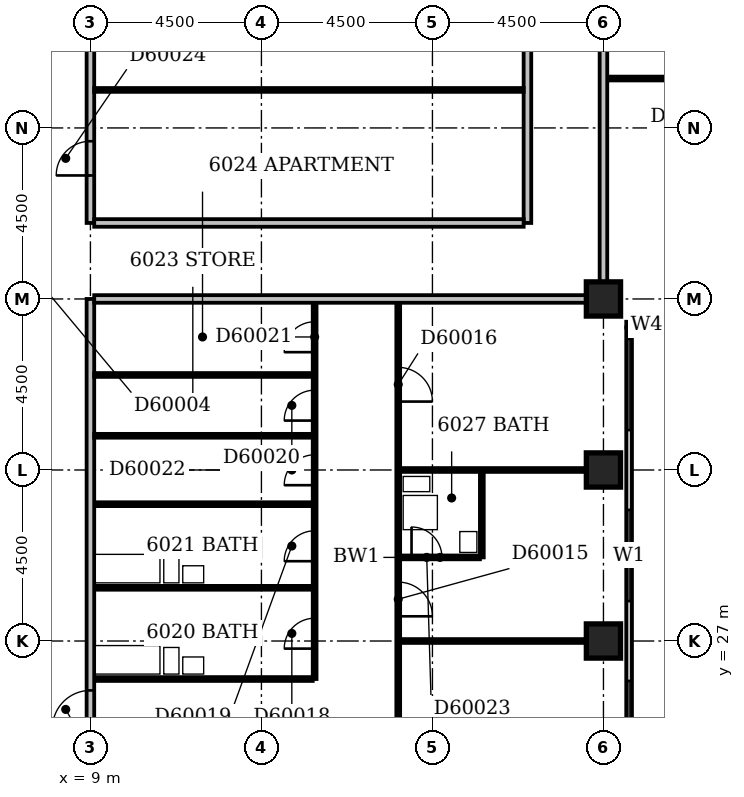
"""IFC4 building model, lengths in metres.
Left out: names, types, materials, properties, quantities, classifications, styles, units other than length and angle.
Written with IfcOpenShell. Run it as: python <this file> out.ifc"""

import sys

from ifc_helpers import new_model, si_unit, direction, frame, frame_2d, origin, origin_2d, place, context, subcontext, project, spatial, rectangle, extrude, element, fill, save


model = new_model("IFC4")
c1 = context("Model", 3, precision=1e-05, world=origin(), true_north=direction((0.0, 1.0)))
c2 = subcontext(c1, "Body", "Model", "MODEL_VIEW")
j1 = project(units=[si_unit("LENGTHUNIT", "METRE"), si_unit("PLANEANGLEUNIT", "RADIAN")], contexts=[c1])
p1 = place(None, origin())
s1 = spatial("IfcSite", under=j1, at=p1, CompositionType="ELEMENT")
p2 = place(p1, origin())
s2 = spatial("IfcBuilding", under=s1, at=p2, CompositionType="ELEMENT")
p3 = place(p2, frame((0.0, 0.0, 233.0)))
s3 = spatial("IfcBuildingStorey", under=s2, at=p3, CompositionType="ELEMENT", Elevation=233.0)
for number, where, z_axis, x_axis in (
    (1, (22.5, 27.0, -0.35), (0.0, 0.0, 1.0), (1.0, 0.0, 0.0)),
    (2, (22.5, 31.5, -0.35), (0.0, 0.0, 1.0), (1.0, 0.0, 0.0)),
    (3, (22.5, 36.0, -0.35), (0.0, 0.0, 1.0), (1.0, 0.0, 0.0)),
):
    element("IfcColumn", number, at=place(p3, frame(where, z_axis=z_axis, x_axis=x_axis)), inside=s3, PredefinedType="COLUMN", context=c2, shape_type="SweptSolid", body=[
        extrude(rectangle(XDim=0.9, YDim=0.9, at=origin_2d()), origin(), (0.0, 0.0, 1.0), 3.65),
    ])
p4 = place(p3, frame((23.175, 17.4, 0.0), z_axis=(0.0, 0.0, 1.0), x_axis=(0.0, 1.0, 0.0)))
e4 = element("IfcWall", 4, at=p4, inside=s3, PredefinedType="STANDARD", context=c2, shape_type="SweptSolid", body=[
    extrude(rectangle(XDim=17.85, YDim=0.15, at=frame_2d((8.925, 0.0))), origin(), (0.0, 0.0, 1.0), 2.7),
])
p5 = place(p4, frame((2.941, 0.0, 0.6)))
e5 = element("IfcOpeningElement", 5, at=p5, cuts=e4, PredefinedType="OPENING", context=c2, shape_type="SweptSolid", body=[
    extrude(rectangle(XDim=1.5, YDim=1.8, at=frame_2d((0.75, 0.9))), frame((0.0, 0.087, 0.0), z_axis=(0.0, -1.0, 0.0), x_axis=(1.0, 0.0, 0.0)), (0.0, 0.0, 1.0), 0.174),
])
p6 = place(p4, frame((6.15, 0.0, 0.6)))
e6 = element("IfcOpeningElement", 6, at=p6, cuts=e4, PredefinedType="OPENING", context=c2, shape_type="SweptSolid", body=[
    extrude(rectangle(XDim=2.4, YDim=1.8, at=frame_2d((1.2, 0.9))), frame((0.0, 0.087, 0.0), z_axis=(0.0, -1.0, 0.0), x_axis=(1.0, 0.0, 0.0)), (0.0, 0.0, 1.0), 0.174),
])
p7 = place(p4, frame((10.65, 0.0, 0.6)))
e7 = element("IfcOpeningElement", 7, at=p7, cuts=e4, PredefinedType="OPENING", context=c2, shape_type="SweptSolid", body=[
    extrude(rectangle(XDim=2.4, YDim=1.8, at=frame_2d((1.2, 0.9))), frame((0.0, 0.087, 0.0), z_axis=(0.0, -1.0, 0.0), x_axis=(1.0, 0.0, 0.0)), (0.0, 0.0, 1.0), 0.174),
])
p8 = place(p4, frame((15.15, 0.0, 0.6)))
e8 = element("IfcOpeningElement", 8, at=p8, cuts=e4, PredefinedType="OPENING", context=c2, shape_type="SweptSolid", body=[
    extrude(rectangle(XDim=2.4, YDim=1.8, at=frame_2d((1.2, 0.9))), frame((0.0, 0.087, 0.0), z_axis=(0.0, -1.0, 0.0), x_axis=(1.0, 0.0, 0.0)), (0.0, 0.0, 1.0), 0.174),
])
p9 = place(p3, frame((23.1, 35.325, 0.0), z_axis=(0.0, 0.0, 1.0), x_axis=(1.0, 0.0, 0.0)))
e9 = element("IfcWall", 9, at=p9, inside=s3, PredefinedType="STANDARD", context=c2, shape_type="SweptSolid", body=[
    extrude(rectangle(XDim=18.15, YDim=0.15, at=frame_2d((9.075, 0.0))), origin(), (0.0, 0.0, 1.0), 2.7),
])
p10 = place(p9, frame((0.239, 0.0, 0.6)))
e10 = element("IfcOpeningElement", 10, at=p10, cuts=e9, PredefinedType="OPENING", context=c2, shape_type="SweptSolid", body=[
    extrude(rectangle(XDim=0.6, YDim=1.8, at=frame_2d((0.3, 0.9))), frame((0.0, 0.087, 0.0), z_axis=(0.0, -1.0, 0.0), x_axis=(1.0, 0.0, 0.0)), (0.0, 0.0, 1.0), 0.174),
])
p11 = place(p9, frame((2.745, 0.0, 0.6)))
e11 = element("IfcOpeningElement", 11, at=p11, cuts=e9, PredefinedType="OPENING", context=c2, shape_type="SweptSolid", body=[
    extrude(rectangle(XDim=0.45, YDim=1.8, at=frame_2d((0.225, 0.9))), frame((0.0, 0.087, 0.0), z_axis=(0.0, -1.0, 0.0), x_axis=(1.0, 0.0, 0.0)), (0.0, 0.0, 1.0), 0.174),
])
p12 = place(p9, frame((4.95, 0.0, 0.6)))
e12 = element("IfcOpeningElement", 12, at=p12, cuts=e9, PredefinedType="OPENING", context=c2, shape_type="SweptSolid", body=[
    extrude(rectangle(XDim=2.4, YDim=1.8, at=frame_2d((1.2, 0.9))), frame((0.0, 0.087, 0.0), z_axis=(0.0, -1.0, 0.0), x_axis=(1.0, 0.0, 0.0)), (0.0, 0.0, 1.0), 0.174),
])
p13 = place(p9, frame((9.45, 0.0, 0.6)))
e13 = element("IfcOpeningElement", 13, at=p13, cuts=e9, PredefinedType="OPENING", context=c2, shape_type="SweptSolid", body=[
    extrude(rectangle(XDim=2.4, YDim=1.8, at=frame_2d((1.2, 0.9))), frame((0.0, 0.087, 0.0), z_axis=(0.0, -1.0, 0.0), x_axis=(1.0, 0.0, 0.0)), (0.0, 0.0, 1.0), 0.174),
])
p14 = place(p9, frame((13.95, 0.0, 0.6)))
e14 = element("IfcOpeningElement", 14, at=p14, cuts=e9, PredefinedType="OPENING", context=c2, shape_type="SweptSolid", body=[
    extrude(rectangle(XDim=2.4, YDim=1.8, at=frame_2d((1.2, 0.9))), frame((0.0, 0.087, 0.0), z_axis=(0.0, -1.0, 0.0), x_axis=(1.0, 0.0, 0.0)), (0.0, 0.0, 1.0), 0.174),
])
p15 = place(p3, frame((17.1, 17.4, 0.0), z_axis=(0.0, 0.0, 1.0), x_axis=(0.0, 1.0, 0.0)))
e15 = element("IfcWall", 15, at=p15, inside=s3, PredefinedType="PARTITIONING", context=c2, shape_type="SweptSolid", body=[
    extrude(rectangle(XDim=18.5, YDim=0.1, at=frame_2d((9.25, 0.0))), origin(), (0.0, 0.0, 1.0), 3.3),
])
p16 = place(p15, frame((4.6, 0.0, 0.0)))
e16 = element("IfcOpeningElement", 16, at=p16, cuts=e15, PredefinedType="OPENING", context=c2, shape_type="SweptSolid", body=[
    extrude(rectangle(XDim=0.9, YDim=2.1, at=frame_2d((0.45, 1.05))), frame((0.0, 0.062, 0.0), z_axis=(0.0, -1.0, 0.0), x_axis=(1.0, 0.0, 0.0)), (0.0, 0.0, 1.0), 0.124),
])
p17 = place(p15, frame((10.25, 0.0, 0.0)))
e17 = element("IfcOpeningElement", 17, at=p17, cuts=e15, PredefinedType="OPENING", context=c2, shape_type="SweptSolid", body=[
    extrude(rectangle(XDim=0.9, YDim=2.1, at=frame_2d((0.45, 1.05))), frame((0.0, 0.062, 0.0), z_axis=(0.0, -1.0, 0.0), x_axis=(1.0, 0.0, 0.0)), (0.0, 0.0, 1.0), 0.124),
])
p18 = place(p15, frame((15.9, 0.0, 0.0)))
e18 = element("IfcOpeningElement", 18, at=p18, cuts=e15, PredefinedType="OPENING", context=c2, shape_type="SweptSolid", body=[
    extrude(rectangle(XDim=0.9, YDim=2.1, at=frame_2d((0.45, 1.05))), frame((0.0, 0.062, 0.0), z_axis=(0.0, -1.0, 0.0), x_axis=(1.0, 0.0, 0.0)), (0.0, 0.0, 1.0), 0.124),
])
p19 = place(p3, frame((9.0, 18.45, 0.0), z_axis=(0.0, 0.0, 1.0), x_axis=(0.0, 1.0, 0.0)))
e19 = element("IfcWall", 19, at=p19, inside=s3, PredefinedType="PARTITIONING", context=c2, shape_type="SweptSolid", body=[
    extrude(rectangle(XDim=17.55, YDim=0.2, at=frame_2d((8.775, 0.0))), origin(), (0.0, 0.0, 1.0), 3.3),
])
p20 = place(p19, frame((6.25, 0.0, 0.0)))
e20 = element("IfcOpeningElement", 20, at=p20, cuts=e19, PredefinedType="OPENING", context=c2, shape_type="SweptSolid", body=[
    extrude(rectangle(XDim=1.0, YDim=2.1, at=frame_2d((0.5, 1.05))), frame((0.0, 0.112, 0.0), z_axis=(0.0, -1.0, 0.0), x_axis=(1.0, 0.0, 0.0)), (0.0, 0.0, 1.0), 0.224),
])
p21 = place(p3, frame((9.1, 26.0, 0.0), z_axis=(0.0, 0.0, 1.0), x_axis=(1.0, 0.0, 0.0)))
e21 = element("IfcWall", 21, at=p21, inside=s3, PredefinedType="PLUMBINGWALL", context=c2, shape_type="SweptSolid", body=[
    extrude(rectangle(XDim=5.75, YDim=0.1, at=frame_2d((2.875, 0.0))), origin(), (0.0, 0.0, 1.0), 3.3),
])
p22 = place(p3, frame((14.9, 26.0, 0.0), z_axis=(0.0, 0.0, 1.0), x_axis=(0.0, 1.0, 0.0)))
e22 = element("IfcWall", 22, at=p22, inside=s3, PredefinedType="PARTITIONING", context=c2, shape_type="SweptSolid", body=[
    extrude(rectangle(XDim=9.9, YDim=0.1, at=frame_2d((4.95, 0.0))), origin(), (0.0, 0.0, 1.0), 3.3),
])
p23 = place(p22, frame((0.8, 0.0, 0.0)))
e23 = element("IfcOpeningElement", 23, at=p23, cuts=e22, PredefinedType="OPENING", context=c2, shape_type="SweptSolid", body=[
    extrude(rectangle(XDim=0.8, YDim=2.1, at=frame_2d((0.4, 1.05))), frame((0.0, 0.062, 0.0), z_axis=(0.0, -1.0, 0.0), x_axis=(1.0, 0.0, 0.0)), (0.0, 0.0, 1.0), 0.124),
])
p24 = place(p22, frame((3.1, 0.0, 0.0)))
e24 = element("IfcOpeningElement", 24, at=p24, cuts=e22, PredefinedType="OPENING", context=c2, shape_type="SweptSolid", body=[
    extrude(rectangle(XDim=0.8, YDim=2.1, at=frame_2d((0.4, 1.05))), frame((0.0, 0.062, 0.0), z_axis=(0.0, -1.0, 0.0), x_axis=(1.0, 0.0, 0.0)), (0.0, 0.0, 1.0), 0.124),
])
p25 = place(p22, frame((6.8, 0.0, 0.0)))
e25 = element("IfcOpeningElement", 25, at=p25, cuts=e22, PredefinedType="OPENING", context=c2, shape_type="SweptSolid", body=[
    extrude(rectangle(XDim=0.8, YDim=2.1, at=frame_2d((0.4, 1.05))), frame((0.0, 0.062, 0.0), z_axis=(0.0, -1.0, 0.0), x_axis=(1.0, 0.0, 0.0)), (0.0, 0.0, 1.0), 0.124),
])
p26 = place(p22, frame((8.6, 0.0, 0.0)))
e26 = element("IfcOpeningElement", 26, at=p26, cuts=e22, PredefinedType="OPENING", context=c2, shape_type="SweptSolid", body=[
    extrude(rectangle(XDim=0.8, YDim=2.1, at=frame_2d((0.4, 1.05))), frame((0.0, 0.062, 0.0), z_axis=(0.0, -1.0, 0.0), x_axis=(1.0, 0.0, 0.0)), (0.0, 0.0, 1.0), 0.124),
])
p27 = place(p22, frame((5.1, 0.0, 0.0)))
e27 = element("IfcOpeningElement", 27, at=p27, cuts=e22, PredefinedType="OPENING", context=c2, shape_type="SweptSolid", body=[
    extrude(rectangle(XDim=0.8, YDim=2.1, at=frame_2d((0.4, 1.05))), frame((0.0, 0.062, 0.0), z_axis=(0.0, -1.0, 0.0), x_axis=(1.0, 0.0, 0.0)), (0.0, 0.0, 1.0), 0.124),
])
p28 = place(p3, frame((17.15, 27.0, 0.0), z_axis=(0.0, 0.0, 1.0), x_axis=(1.0, 0.0, 0.0)))
e28 = element("IfcWall", 28, at=p28, inside=s3, PredefinedType="PARTITIONING", context=c2, shape_type="SweptSolid", body=[
    extrude(rectangle(XDim=4.9, YDim=0.1, at=frame_2d((2.45, 0.0))), origin(), (0.0, 0.0, 1.0), 2.7),
])
p29 = place(p3, frame((9.1, 28.4, 0.0), z_axis=(0.0, 0.0, 1.0), x_axis=(1.0, 0.0, 0.0)))
e29 = element("IfcWall", 29, at=p29, inside=s3, PredefinedType="PLUMBINGWALL", context=c2, shape_type="SweptSolid", body=[
    extrude(rectangle(XDim=5.75, YDim=0.1, at=frame_2d((2.875, 0.0))), origin(), (0.0, 0.0, 1.0), 3.3),
])
p30 = place(p3, frame((17.15, 29.2, 0.0), z_axis=(0.0, 0.0, 1.0), x_axis=(1.0, 0.0, 0.0)))
e30 = element("IfcWall", 30, at=p30, inside=s3, PredefinedType="PLUMBINGWALL", context=c2, shape_type="SweptSolid", body=[
    extrude(rectangle(XDim=2.1, YDim=0.1, at=frame_2d((1.05, 0.0))), origin(), (0.0, 0.0, 1.0), 3.3),
])
p31 = place(p30, frame((0.3, 0.0, 0.0)))
e31 = element("IfcOpeningElement", 31, at=p31, cuts=e30, PredefinedType="OPENING", context=c2, shape_type="SweptSolid", body=[
    extrude(rectangle(XDim=0.8, YDim=2.1, at=frame_2d((0.4, 1.05))), frame((0.0, 0.062, 0.0), z_axis=(0.0, -1.0, 0.0), x_axis=(1.0, 0.0, 0.0)), (0.0, 0.0, 1.0), 0.124),
])
p32 = place(p3, frame((19.3, 29.2, 0.0), z_axis=(0.0, 0.0, 1.0), x_axis=(0.0, 1.0, 0.0)))
e32 = element("IfcWall", 32, at=p32, inside=s3, PredefinedType="PLUMBINGWALL", context=c2, shape_type="SweptSolid", body=[
    extrude(rectangle(XDim=2.25, YDim=0.1, at=frame_2d((1.125, 0.0))), origin(), (0.0, 0.0, 1.0), 3.3),
])
p33 = place(p3, frame((9.1, 30.6, 0.0), z_axis=(0.0, 0.0, 1.0), x_axis=(1.0, 0.0, 0.0)))
e33 = element("IfcWall", 33, at=p33, inside=s3, PredefinedType="PLUMBINGWALL", context=c2, shape_type="SweptSolid", body=[
    extrude(rectangle(XDim=5.75, YDim=0.1, at=frame_2d((2.875, 0.0))), origin(), (0.0, 0.0, 1.0), 3.3),
])
p34 = place(p3, frame((17.15, 31.5, 0.0), z_axis=(0.0, 0.0, 1.0), x_axis=(1.0, 0.0, 0.0)))
e34 = element("IfcWall", 34, at=p34, inside=s3, PredefinedType="PARTITIONING", context=c2, shape_type="SweptSolid", body=[
    extrude(rectangle(XDim=4.9, YDim=0.1, at=frame_2d((2.45, 0.0))), origin(), (0.0, 0.0, 1.0), 3.3),
])
for number, where, z_axis, x_axis in (
    (35, (9.1, 32.4, 0.0), (0.0, 0.0, 1.0), (1.0, 0.0, 0.0)),
    (36, (9.1, 34.0, 0.0), (0.0, 0.0, 1.0), (1.0, 0.0, 0.0)),
):
    element("IfcWall", number, at=place(p3, frame(where, z_axis=z_axis, x_axis=x_axis)), inside=s3, PredefinedType="PARTITIONING", context=c2, shape_type="SweptSolid", body=[
        extrude(rectangle(XDim=5.75, YDim=0.1, at=frame_2d((2.875, 0.0))), origin(), (0.0, 0.0, 1.0), 3.3),
    ])
p35 = place(p3, frame((9.1, 36.0, 0.0), z_axis=(0.0, 0.0, 1.0), x_axis=(1.0, 0.0, 0.0)))
e37 = element("IfcWall", 37, at=p35, inside=s3, PredefinedType="PARTITIONING", context=c2, shape_type="SweptSolid", body=[
    extrude(rectangle(XDim=12.95, YDim=0.2, at=frame_2d((6.475, 0.0))), origin(), (0.0, 0.0, 1.0), 3.3),
])
p36 = place(p3, frame((22.5, 36.45, 0.0), z_axis=(0.0, 0.0, 1.0), x_axis=(0.0, 1.0, 0.0)))
e38 = element("IfcWall", 38, at=p36, inside=s3, PredefinedType="PARTITIONING", context=c2, shape_type="SweptSolid", body=[
    extrude(rectangle(XDim=13.05, YDim=0.2, at=frame_2d((6.525, 0.0))), origin(), (0.0, 0.0, 1.0), 3.3),
])
p37 = place(p3, frame((9.0, 38.0, 0.0), z_axis=(0.0, 0.0, 1.0), x_axis=(0.0, 1.0, 0.0)))
e39 = element("IfcWall", 39, at=p37, inside=s3, PredefinedType="PARTITIONING", context=c2, shape_type="SweptSolid", body=[
    extrude(rectangle(XDim=11.5, YDim=0.2, at=frame_2d((5.75, 0.0))), origin(), (0.0, 0.0, 1.0), 3.3),
])
p38 = place(p37, frame((1.25, 0.0, 0.0)))
e40 = element("IfcOpeningElement", 40, at=p38, cuts=e39, PredefinedType="OPENING", context=c2, shape_type="SweptSolid", body=[
    extrude(rectangle(XDim=0.9, YDim=2.1, at=frame_2d((0.45, 1.05))), frame((0.0, 0.112, 0.0), z_axis=(0.0, -1.0, 0.0), x_axis=(1.0, 0.0, 0.0)), (0.0, 0.0, 1.0), 0.224),
])
p39 = place(p3, frame((9.1, 38.0, 0.0), z_axis=(0.0, 0.0, 1.0), x_axis=(1.0, 0.0, 0.0)))
e41 = element("IfcWall", 41, at=p39, inside=s3, PredefinedType="PARTITIONING", context=c2, shape_type="SweptSolid", body=[
    extrude(rectangle(XDim=11.3, YDim=0.2, at=frame_2d((5.65, 0.0))), origin(), (0.0, 0.0, 1.0), 3.3),
])
p40 = place(p3, frame((20.5, 38.0, 0.0), z_axis=(0.0, 0.0, 1.0), x_axis=(0.0, 1.0, 0.0)))
e42 = element("IfcWall", 42, at=p40, inside=s3, PredefinedType="PARTITIONING", context=c2, shape_type="SweptSolid", body=[
    extrude(rectangle(XDim=11.5, YDim=0.2, at=frame_2d((5.75, 0.0))), origin(), (0.0, 0.0, 1.0), 3.3),
])
p41 = place(p3, frame((9.1, 41.5, 0.0), z_axis=(0.0, 0.0, 1.0), x_axis=(1.0, 0.0, 0.0)))
e43 = element("IfcWall", 43, at=p41, inside=s3, PredefinedType="PARTITIONING", context=c2, shape_type="SweptSolid", body=[
    extrude(rectangle(XDim=11.3, YDim=0.1, at=frame_2d((5.65, 0.0))), origin(), (0.0, 0.0, 1.0), 3.3),
])
p42 = place(p3, frame((22.6, 41.8, 0.0), z_axis=(0.0, 0.0, 1.0), x_axis=(1.0, 0.0, 0.0)))
e44 = element("IfcWall", 44, at=p42, inside=s3, PredefinedType="PARTITIONING", context=c2, shape_type="SweptSolid", body=[
    extrude(rectangle(XDim=8.8, YDim=0.1, at=frame_2d((4.4, 0.0))), origin(), (0.0, 0.0, 1.0), 3.3),
])
p43 = place(p42, frame((1.7, 0.0, 0.0)))
e45 = element("IfcOpeningElement", 45, at=p43, cuts=e44, PredefinedType="OPENING", context=c2, shape_type="SweptSolid", body=[
    extrude(rectangle(XDim=0.9, YDim=2.1, at=frame_2d((0.45, 1.05))), frame((0.0, 0.062, 0.0), z_axis=(0.0, -1.0, 0.0), x_axis=(1.0, 0.0, 0.0)), (0.0, 0.0, 1.0), 0.124),
])
p44 = place(p42, frame((5.05, 0.0, 0.0)))
e46 = element("IfcOpeningElement", 46, at=p44, cuts=e44, PredefinedType="OPENING", context=c2, shape_type="SweptSolid", body=[
    extrude(rectangle(XDim=0.9, YDim=2.1, at=frame_2d((0.45, 1.05))), frame((0.0, 0.062, 0.0), z_axis=(0.0, -1.0, 0.0), x_axis=(1.0, 0.0, 0.0)), (0.0, 0.0, 1.0), 0.124),
])
p45 = place(p6, origin())
e47 = element("IfcWindow", 47, at=p45, inside=s3, PartitioningType="SINGLE_PANEL", PredefinedType="WINDOW", context=c2, shape_type="SweptSolid", body=[
    extrude(rectangle(XDim=2.4, YDim=1.8, at=frame_2d((1.2, 0.9))), frame((0.0, 0.03, 0.0), z_axis=(0.0, -1.0, 0.0), x_axis=(1.0, 0.0, 0.0)), (0.0, 0.0, 1.0), 0.06),
])
fill(e6, e47)
p46 = place(p7, origin())
e48 = element("IfcWindow", 48, at=p46, inside=s3, PartitioningType="SINGLE_PANEL", PredefinedType="WINDOW", context=c2, shape_type="SweptSolid", body=[
    extrude(rectangle(XDim=2.4, YDim=1.8, at=frame_2d((1.2, 0.9))), frame((0.0, 0.03, 0.0), z_axis=(0.0, -1.0, 0.0), x_axis=(1.0, 0.0, 0.0)), (0.0, 0.0, 1.0), 0.06),
])
fill(e7, e48)
p47 = place(p8, origin())
e49 = element("IfcWindow", 49, at=p47, inside=s3, PartitioningType="SINGLE_PANEL", PredefinedType="WINDOW", context=c2, shape_type="SweptSolid", body=[
    extrude(rectangle(XDim=2.4, YDim=1.8, at=frame_2d((1.2, 0.9))), frame((0.0, 0.03, 0.0), z_axis=(0.0, -1.0, 0.0), x_axis=(1.0, 0.0, 0.0)), (0.0, 0.0, 1.0), 0.06),
])
fill(e8, e49)
p48 = place(p10, origin())
e50 = element("IfcWindow", 50, at=p48, inside=s3, PartitioningType="SINGLE_PANEL", PredefinedType="WINDOW", context=c2, shape_type="SweptSolid", body=[
    extrude(rectangle(XDim=0.6, YDim=1.8, at=frame_2d((0.3, 0.9))), frame((0.0, 0.03, 0.0), z_axis=(0.0, -1.0, 0.0), x_axis=(1.0, 0.0, 0.0)), (0.0, 0.0, 1.0), 0.06),
])
fill(e10, e50)
p49 = place(p17, frame((0.9, 0.0, 0.0), z_axis=(0.0, 0.0, 1.0), x_axis=(-1.0, 0.0, 0.0)))
e51 = element("IfcDoor", 51, at=p49, inside=s3, OperationType="SINGLE_SWING_RIGHT", PredefinedType="DOOR", context=c2, shape_type="SweptSolid", body=[
    extrude(rectangle(XDim=0.9, YDim=2.1, at=frame_2d((0.45, 1.05))), frame((0.0, 0.025, 0.0), z_axis=(0.0, -1.0, 0.0), x_axis=(1.0, 0.0, 0.0)), (0.0, 0.0, 1.0), 0.05),
])
fill(e17, e51)
p50 = place(p18, frame((0.9, 0.0, 0.0), z_axis=(0.0, 0.0, 1.0), x_axis=(-1.0, 0.0, 0.0)))
e52 = element("IfcDoor", 52, at=p50, inside=s3, OperationType="SINGLE_SWING_RIGHT", PredefinedType="DOOR", context=c2, shape_type="SweptSolid", body=[
    extrude(rectangle(XDim=0.9, YDim=2.1, at=frame_2d((0.45, 1.05))), frame((0.0, 0.025, 0.0), z_axis=(0.0, -1.0, 0.0), x_axis=(1.0, 0.0, 0.0)), (0.0, 0.0, 1.0), 0.05),
])
fill(e18, e52)
p51 = place(p20, origin())
e53 = element("IfcDoor", 53, at=p51, inside=s3, OperationType="SINGLE_SWING_LEFT", PredefinedType="DOOR", context=c2, shape_type="SweptSolid", body=[
    extrude(rectangle(XDim=1.0, YDim=2.1, at=frame_2d((0.5, 1.05))), frame((0.0, 0.025, 0.0), z_axis=(0.0, -1.0, 0.0), x_axis=(1.0, 0.0, 0.0)), (0.0, 0.0, 1.0), 0.05),
])
fill(e20, e53)
p52 = place(p23, origin())
e54 = element("IfcDoor", 54, at=p52, inside=s3, OperationType="SINGLE_SWING_LEFT", PredefinedType="DOOR", context=c2, shape_type="SweptSolid", body=[
    extrude(rectangle(XDim=0.8, YDim=2.1, at=frame_2d((0.4, 1.05))), frame((0.0, 0.025, 0.0), z_axis=(0.0, -1.0, 0.0), x_axis=(1.0, 0.0, 0.0)), (0.0, 0.0, 1.0), 0.05),
])
fill(e23, e54)
p53 = place(p24, origin())
e55 = element("IfcDoor", 55, at=p53, inside=s3, OperationType="SINGLE_SWING_LEFT", PredefinedType="DOOR", context=c2, shape_type="SweptSolid", body=[
    extrude(rectangle(XDim=0.8, YDim=2.1, at=frame_2d((0.4, 1.05))), frame((0.0, 0.025, 0.0), z_axis=(0.0, -1.0, 0.0), x_axis=(1.0, 0.0, 0.0)), (0.0, 0.0, 1.0), 0.05),
])
fill(e24, e55)
p54 = place(p25, origin())
e56 = element("IfcDoor", 56, at=p54, inside=s3, OperationType="SINGLE_SWING_LEFT", PredefinedType="DOOR", context=c2, shape_type="SweptSolid", body=[
    extrude(rectangle(XDim=0.8, YDim=2.1, at=frame_2d((0.4, 1.05))), frame((0.0, 0.025, 0.0), z_axis=(0.0, -1.0, 0.0), x_axis=(1.0, 0.0, 0.0)), (0.0, 0.0, 1.0), 0.05),
])
fill(e25, e56)
p55 = place(p26, origin())
e57 = element("IfcDoor", 57, at=p55, inside=s3, OperationType="SINGLE_SWING_LEFT", PredefinedType="DOOR", context=c2, shape_type="SweptSolid", body=[
    extrude(rectangle(XDim=0.8, YDim=2.1, at=frame_2d((0.4, 1.05))), frame((0.0, 0.025, 0.0), z_axis=(0.0, -1.0, 0.0), x_axis=(1.0, 0.0, 0.0)), (0.0, 0.0, 1.0), 0.05),
])
fill(e26, e57)
p56 = place(p27, origin())
e58 = element("IfcDoor", 58, at=p56, inside=s3, OperationType="SINGLE_SWING_LEFT", PredefinedType="DOOR", context=c2, shape_type="SweptSolid", body=[
    extrude(rectangle(XDim=0.8, YDim=2.1, at=frame_2d((0.4, 1.05))), frame((0.0, 0.025, 0.0), z_axis=(0.0, -1.0, 0.0), x_axis=(1.0, 0.0, 0.0)), (0.0, 0.0, 1.0), 0.05),
])
fill(e27, e58)
p57 = place(p31, origin())
e59 = element("IfcDoor", 59, at=p57, inside=s3, OperationType="SINGLE_SWING_LEFT", PredefinedType="DOOR", context=c2, shape_type="SweptSolid", body=[
    extrude(rectangle(XDim=0.8, YDim=2.1, at=frame_2d((0.4, 1.05))), frame((0.0, 0.025, 0.0), z_axis=(0.0, -1.0, 0.0), x_axis=(1.0, 0.0, 0.0)), (0.0, 0.0, 1.0), 0.05),
])
fill(e31, e59)
p58 = place(p38, origin())
e60 = element("IfcDoor", 60, at=p58, inside=s3, OperationType="SINGLE_SWING_LEFT", PredefinedType="DOOR", context=c2, shape_type="SweptSolid", body=[
    extrude(rectangle(XDim=0.9, YDim=2.1, at=frame_2d((0.45, 1.05))), frame((0.0, 0.025, 0.0), z_axis=(0.0, -1.0, 0.0), x_axis=(1.0, 0.0, 0.0)), (0.0, 0.0, 1.0), 0.05),
])
fill(e40, e60)
save(model, sys.argv[1])
